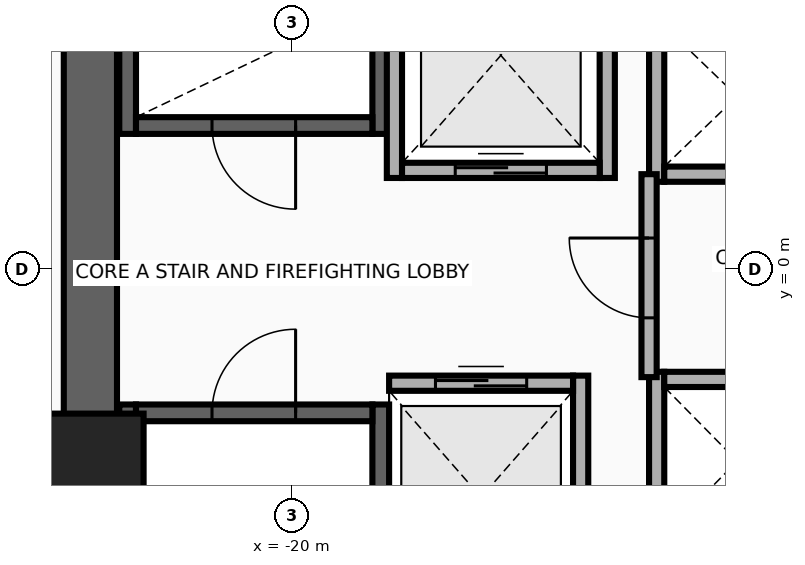
"""IFC4 building model, lengths in metres.
Left out: names, types, materials, properties, quantities, classifications, styles, units other than length and angle.
Written with IfcOpenShell. Run it as: python <this file> out.ifc"""

import sys

from ifc_helpers import new_model, si_unit, direction, frame, frame_2d, origin, origin_2d, place, context, subcontext, project, spatial, rectangle, extrude, source, transform, mapped, element, fill, save


model = new_model("IFC4")
c1 = context("Model", 3, precision=1e-05, world=origin(), true_north=direction((0.0, 1.0)))
c2 = subcontext(c1, "Body", "Model", "MODEL_VIEW")
j1 = project(units=[si_unit("LENGTHUNIT", "METRE"), si_unit("PLANEANGLEUNIT", "RADIAN")], contexts=[c1])
p1 = place(None, origin())
s1 = spatial("IfcSite", under=j1, at=p1, CompositionType="ELEMENT")
p2 = place(p1, origin())
s2 = spatial("IfcBuilding", under=s1, at=p2, CompositionType="ELEMENT")
p3 = place(p2, frame((0.0, 0.0, 33.4)))
s3 = spatial("IfcBuildingStorey", under=s2, at=p3, CompositionType="ELEMENT", Elevation=33.4)
for number, where, z_axis, x_axis in (
    (1, (-22.16, 1.78, 0.0), (0.0, 0.0, 1.0), (0.0, 1.0, 0.0)),
    (2, (-18.83, 1.78, 0.0), (0.0, 0.0, 1.0), (0.0, 1.0, 0.0)),
):
    element("IfcWall", number, at=place(p3, frame(where, z_axis=z_axis, x_axis=x_axis)), inside=s3, PredefinedType="SHEAR", context=c2, shape_type="SweptSolid", body=[
        extrude(rectangle(XDim=8.67, YDim=0.22, at=frame_2d((4.335, 0.0))), origin(), (0.0, 0.0, 1.0), 3.46),
    ])
p4 = place(p3, frame((-22.05, 1.89, 0.0), z_axis=(0.0, 0.0, 1.0), x_axis=(1.0, 0.0, 0.0)))
e3 = element("IfcWall", 3, at=p4, inside=s3, PredefinedType="SHEAR", context=c2, shape_type="SweptSolid", body=[
    extrude(rectangle(XDim=3.11, YDim=0.22, at=frame_2d((1.555, 0.0))), origin(), (0.0, 0.0, 1.0), 3.46),
])
p5 = place(p4, frame((1.0, 0.0, 0.0)))
e4 = element("IfcOpeningElement", 4, at=p5, cuts=e3, PredefinedType="OPENING", context=c2, shape_type="SweptSolid", body=[
    extrude(rectangle(XDim=1.1, YDim=2.15, at=frame_2d((0.55, 1.075))), frame((0.0, 0.125, 0.0), z_axis=(0.0, -1.0, 0.0), x_axis=(1.0, 0.0, 0.0)), (0.0, 0.0, 1.0), 0.25),
])
for number, where, z_axis, x_axis in (
    (5, (-22.16, -10.45, 0.0), (0.0, 0.0, 1.0), (0.0, 1.0, 0.0)),
    (6, (-18.83, -10.45, 0.0), (0.0, 0.0, 1.0), (0.0, 1.0, 0.0)),
):
    element("IfcWall", number, at=place(p3, frame(where, z_axis=z_axis, x_axis=x_axis)), inside=s3, PredefinedType="SHEAR", context=c2, shape_type="SweptSolid", body=[
        extrude(rectangle(XDim=8.67, YDim=0.22, at=frame_2d((4.335, 0.0))), origin(), (0.0, 0.0, 1.0), 3.46),
    ])
p6 = place(p3, frame((-22.05, -1.89, 0.0), z_axis=(0.0, 0.0, 1.0), x_axis=(1.0, 0.0, 0.0)))
e7 = element("IfcWall", 7, at=p6, inside=s3, PredefinedType="SHEAR", context=c2, shape_type="SweptSolid", body=[
    extrude(rectangle(XDim=3.11, YDim=0.22, at=frame_2d((1.555, 0.0))), origin(), (0.0, 0.0, 1.0), 3.46),
])
p7 = place(p6, frame((1.0, 0.0, 0.0)))
e8 = element("IfcOpeningElement", 8, at=p7, cuts=e7, PredefinedType="OPENING", context=c2, shape_type="SweptSolid", body=[
    extrude(rectangle(XDim=1.1, YDim=2.15, at=frame_2d((0.55, 1.075))), frame((0.0, 0.125, 0.0), z_axis=(0.0, -1.0, 0.0), x_axis=(1.0, 0.0, 0.0)), (0.0, 0.0, 1.0), 0.25),
])
p8 = place(p3, frame((-22.65, -11.15, 0.0), z_axis=(0.0, 0.0, 1.0), x_axis=(0.0, 1.0, 0.0)))
e9 = element("IfcWall", 9, at=p8, inside=s3, PredefinedType="SHEAR", context=c2, shape_type="SweptSolid", body=[
    extrude(rectangle(XDim=22.3, YDim=0.7, at=frame_2d((11.15, 0.0))), origin(), (0.0, 0.0, 1.0), 3.46),
])
m1 = source(origin(), c2, "Body", "SweptSolid", [
    extrude(rectangle(XDim=1.4, YDim=1.4, at=origin_2d()), origin(), (0.0, 0.0, 1.0), 3.7),
])
p9 = place(p3, frame((-22.65, -2.6, 0.0), z_axis=(0.0, 0.0, 1.0), x_axis=(1.0, 0.0, 0.0)))
e10 = element("IfcColumn", 10, at=p9, inside=s3, PredefinedType="COLUMN", context=c2, shape_type="MappedRepresentation", body=[
    mapped(m1, transform((0.0, 0.0, 0.0), x_axis=(1.0, 0.0, 0.0), y_axis=(0.0, 1.0, 0.0), z_axis=(0.0, 0.0, 1.0), scale=1.0)),
])
for number, where, z_axis, x_axis in (
    (11, (-18.65, 1.2, 0.0), (0.0, 0.0, 1.0), (0.0, 1.0, 0.0)),
    (12, (-15.85, 1.2, 0.0), (0.0, 0.0, 1.0), (0.0, 1.0, 0.0)),
):
    element("IfcWall", number, at=place(p3, frame(where, z_axis=z_axis, x_axis=x_axis)), inside=s3, PredefinedType="MOVABLE", context=c2, shape_type="SweptSolid", body=[
        extrude(rectangle(XDim=3.225, YDim=0.2, at=frame_2d((1.613, 0.0))), origin(), (0.0, 0.0, 1.0), 3.46),
    ])
p10 = place(p3, frame((-18.55, 1.3, 0.0), z_axis=(0.0, 0.0, 1.0), x_axis=(1.0, 0.0, 0.0)))
e13 = element("IfcWall", 13, at=p10, inside=s3, PredefinedType="MOVABLE", context=c2, shape_type="SweptSolid", body=[
    extrude(rectangle(XDim=2.6, YDim=0.2, at=frame_2d((1.3, 0.0))), origin(), (0.0, 0.0, 1.0), 3.46),
])
p11 = place(p10, frame((0.7, 0.0, 0.0)))
e14 = element("IfcOpeningElement", 14, at=p11, cuts=e13, PredefinedType="OPENING", context=c2, shape_type="SweptSolid", body=[
    extrude(rectangle(XDim=1.2, YDim=2.1, at=frame_2d((0.6, 1.05))), frame((0.0, 0.115, 0.0), z_axis=(0.0, -1.0, 0.0), x_axis=(1.0, 0.0, 0.0)), (0.0, 0.0, 1.0), 0.23),
])
p12 = place(p3, frame((-16.2, -4.6, 0.0), z_axis=(0.0, 0.0, 1.0), x_axis=(0.0, 1.0, 0.0)))
e15 = element("IfcWall", 15, at=p12, inside=s3, PredefinedType="MOVABLE", context=c2, shape_type="SweptSolid", body=[
    extrude(rectangle(XDim=3.2, YDim=0.2, at=frame_2d((1.6, 0.0))), origin(), (0.0, 0.0, 1.0), 3.46),
])
p13 = place(p3, frame((-18.72, -1.5, 0.0), z_axis=(0.0, 0.0, 1.0), x_axis=(1.0, 0.0, 0.0)))
e16 = element("IfcWall", 16, at=p13, inside=s3, PredefinedType="MOVABLE", context=c2, shape_type="SweptSolid", body=[
    extrude(rectangle(XDim=2.42, YDim=0.2, at=frame_2d((1.21, 0.0))), origin(), (0.0, 0.0, 1.0), 3.46),
])
p14 = place(p13, frame((0.61, 0.0, 0.0)))
e17 = element("IfcOpeningElement", 17, at=p14, cuts=e16, PredefinedType="OPENING", context=c2, shape_type="SweptSolid", body=[
    extrude(rectangle(XDim=1.2, YDim=2.1, at=frame_2d((0.6, 1.05))), frame((0.0, 0.115, 0.0), z_axis=(0.0, -1.0, 0.0), x_axis=(1.0, 0.0, 0.0)), (0.0, 0.0, 1.0), 0.23),
])
p15 = place(p3, frame((-15.2, 1.15, 0.0), z_axis=(0.0, 0.0, 1.0), x_axis=(0.0, 1.0, 0.0)))
e18 = element("IfcWall", 18, at=p15, inside=s3, PredefinedType="MOVABLE", context=c2, shape_type="SweptSolid", body=[
    extrude(rectangle(XDim=2.25, YDim=0.2, at=frame_2d((1.125, 0.0))), origin(), (0.0, 0.0, 1.0), 3.46),
])
p16 = place(p3, frame((-15.1, 1.25, 0.0), z_axis=(0.0, 0.0, 1.0), x_axis=(1.0, 0.0, 0.0)))
e19 = element("IfcWall", 19, at=p16, inside=s3, PredefinedType="MOVABLE", context=c2, shape_type="SweptSolid", body=[
    extrude(rectangle(XDim=1.92, YDim=0.2, at=frame_2d((0.96, 0.0))), origin(), (0.0, 0.0, 1.0), 3.46),
])
p17 = place(p3, frame((-15.2, -3.7, 0.0), z_axis=(0.0, 0.0, 1.0), x_axis=(0.0, 1.0, 0.0)))
e20 = element("IfcWall", 20, at=p17, inside=s3, PredefinedType="MOVABLE", context=c2, shape_type="SweptSolid", body=[
    extrude(rectangle(XDim=2.35, YDim=0.2, at=frame_2d((1.175, 0.0))), origin(), (0.0, 0.0, 1.0), 3.46),
])
p18 = place(p3, frame((-15.1, -1.45, 0.0), z_axis=(0.0, 0.0, 1.0), x_axis=(1.0, 0.0, 0.0)))
e21 = element("IfcWall", 21, at=p18, inside=s3, PredefinedType="MOVABLE", context=c2, shape_type="SweptSolid", body=[
    extrude(rectangle(XDim=1.92, YDim=0.2, at=frame_2d((0.96, 0.0))), origin(), (0.0, 0.0, 1.0), 3.46),
])
p19 = place(p3, frame((-15.3, -1.42, 0.0), z_axis=(0.0, 0.0, 1.0), x_axis=(0.0, 1.0, 0.0)))
e22 = element("IfcWall", 22, at=p19, inside=s3, PredefinedType="PARTITIONING", context=c2, shape_type="SweptSolid", body=[
    extrude(rectangle(XDim=2.67, YDim=0.2, at=frame_2d((1.335, 0.0))), origin(), (0.0, 0.0, 1.0), 3.46),
])
p20 = place(p19, frame((0.78, 0.0, 0.0)))
e23 = element("IfcOpeningElement", 23, at=p20, cuts=e22, PredefinedType="OPENING", context=c2, shape_type="SweptSolid", body=[
    extrude(rectangle(XDim=1.05, YDim=2.15, at=frame_2d((0.525, 1.075))), frame((0.0, 0.115, 0.0), z_axis=(0.0, -1.0, 0.0), x_axis=(1.0, 0.0, 0.0)), (0.0, 0.0, 1.0), 0.23),
])
p21 = place(p11, origin())
e24 = element("IfcDoor", 24, at=p21, inside=s3, OperationType="DOUBLE_DOOR_SLIDING", PredefinedType="DOOR", context=c2, shape_type="SweptSolid", body=[
    extrude(rectangle(XDim=1.2, YDim=2.1, at=frame_2d((0.6, 1.05))), frame((0.0, 0.025, 0.0), z_axis=(0.0, -1.0, 0.0), x_axis=(1.0, 0.0, 0.0)), (0.0, 0.0, 1.0), 0.05),
])
fill(e14, e24)
p22 = place(p14, origin())
e25 = element("IfcDoor", 25, at=p22, inside=s3, OperationType="DOUBLE_DOOR_SLIDING", PredefinedType="DOOR", context=c2, shape_type="SweptSolid", body=[
    extrude(rectangle(XDim=1.2, YDim=2.1, at=frame_2d((0.6, 1.05))), frame((0.0, 0.025, 0.0), z_axis=(0.0, -1.0, 0.0), x_axis=(1.0, 0.0, 0.0)), (0.0, 0.0, 1.0), 0.05),
])
fill(e17, e25)
p23 = place(p20, origin())
e26 = element("IfcDoor", 26, at=p23, inside=s3, OperationType="SINGLE_SWING_RIGHT", PredefinedType="DOOR", context=c2, shape_type="SweptSolid", body=[
    extrude(rectangle(XDim=1.05, YDim=2.15, at=frame_2d((0.525, 1.075))), frame((0.0, 0.025, 0.0), z_axis=(0.0, -1.0, 0.0), x_axis=(1.0, 0.0, 0.0)), (0.0, 0.0, 1.0), 0.05),
])
fill(e23, e26)
p24 = place(p5, frame((1.1, 0.0, 0.0), z_axis=(0.0, 0.0, 1.0), x_axis=(-1.0, 0.0, 0.0)))
e27 = element("IfcDoor", 27, at=p24, inside=s3, OperationType="SINGLE_SWING_LEFT", PredefinedType="DOOR", context=c2, shape_type="SweptSolid", body=[
    extrude(rectangle(XDim=1.1, YDim=2.15, at=frame_2d((0.55, 1.075))), frame((0.0, 0.025, 0.0), z_axis=(0.0, -1.0, 0.0), x_axis=(1.0, 0.0, 0.0)), (0.0, 0.0, 1.0), 0.05),
])
fill(e4, e27)
p25 = place(p7, origin())
e28 = element("IfcDoor", 28, at=p25, inside=s3, OperationType="SINGLE_SWING_RIGHT", PredefinedType="DOOR", context=c2, shape_type="SweptSolid", body=[
    extrude(rectangle(XDim=1.1, YDim=2.15, at=frame_2d((0.55, 1.075))), frame((0.0, 0.025, 0.0), z_axis=(0.0, -1.0, 0.0), x_axis=(1.0, 0.0, 0.0)), (0.0, 0.0, 1.0), 0.05),
])
fill(e8, e28)
save(model, sys.argv[1])
